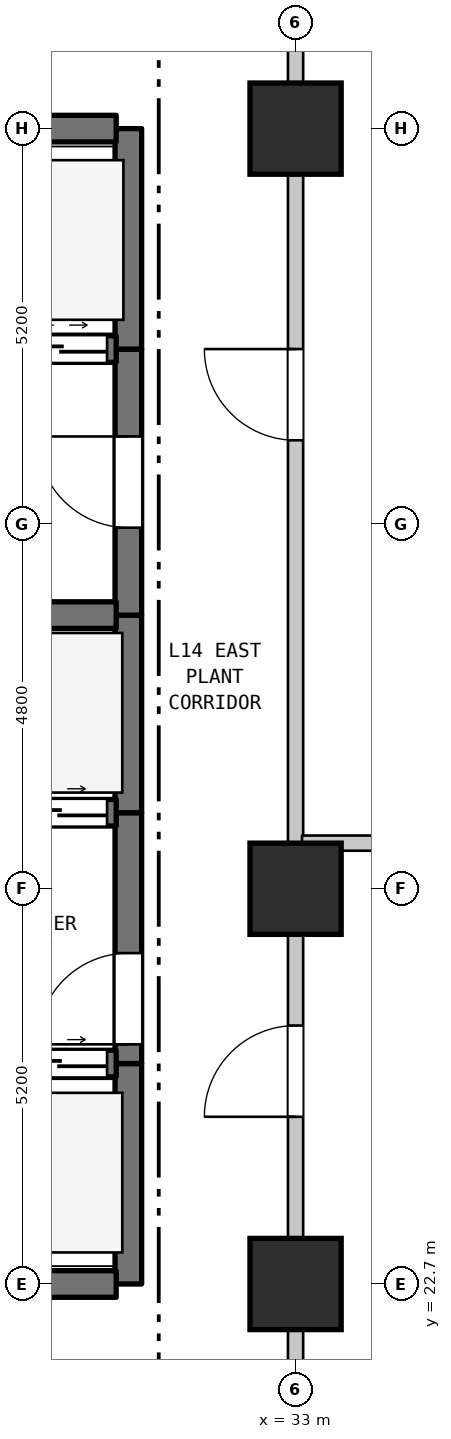
"""IFC4 building model, lengths in metres.
Left out: names, types, materials, properties, quantities, classifications, styles, units other than length and angle.
Written with IfcOpenShell. Run it as: python <this file> out.ifc"""

import sys

from ifc_helpers import new_model, si_unit, direction, frame, frame_2d, origin, origin_2d, place, context, subcontext, project, spatial, rectangle, extrude, element, fill, save


model = new_model("IFC4")
c1 = context("Model", 3, precision=1e-05, world=origin(), true_north=direction((0.0, 1.0)))
c2 = subcontext(c1, "Body", "Model", "MODEL_VIEW")
j1 = project(units=[si_unit("LENGTHUNIT", "METRE"), si_unit("PLANEANGLEUNIT", "RADIAN")], contexts=[c1])
p1 = place(None, origin())
s1 = spatial("IfcSite", under=j1, at=p1, CompositionType="ELEMENT")
p2 = place(p1, origin())
s2 = spatial("IfcBuilding", under=s1, at=p2, CompositionType="ELEMENT")
p3 = place(p2, frame((0.0, 0.0, 61.0)))
s3 = spatial("IfcBuildingStorey", under=s2, at=p3, CompositionType="ELEMENT", Elevation=61.0)
for number, where, z_axis, x_axis in (
    (1, (33.0, 22.7, 0.0), (0.0, 0.0, 1.0), (1.0, 0.0, 0.0)),
    (2, (33.0, 27.9, 0.0), (0.0, 0.0, 1.0), (1.0, 0.0, 0.0)),
    (3, (33.0, 37.9, 0.0), (0.0, 0.0, 1.0), (1.0, 0.0, 0.0)),
):
    element("IfcColumn", number, at=place(p3, frame(where, z_axis=z_axis, x_axis=x_axis)), inside=s3, PredefinedType="COLUMN", context=c2, shape_type="SweptSolid", body=[
        extrude(rectangle(XDim=1.2, YDim=1.2, at=origin_2d()), origin(), (0.0, 0.0, 1.0), 4.6),
    ])
p4 = place(p3, frame((30.8, 22.7, 0.0), z_axis=(0.0, 0.0, 1.0), x_axis=(0.0, 1.0, 0.0)))
e4 = element("IfcWall", 4, at=p4, inside=s3, PredefinedType="SHEAR", context=c2, shape_type="SweptSolid", body=[
    extrude(rectangle(XDim=2.9, YDim=0.35, at=frame_2d((1.45, 0.0))), origin(), (0.0, 0.0, 1.0), 4.28),
])
p5 = place(p3, frame((30.8, 25.6, 0.0), z_axis=(0.0, 0.0, 1.0), x_axis=(0.0, 1.0, 0.0)))
e5 = element("IfcWall", 5, at=p5, inside=s3, PredefinedType="SHEAR", context=c2, shape_type="SweptSolid", body=[
    extrude(rectangle(XDim=3.3, YDim=0.35, at=frame_2d((1.65, 0.0))), origin(), (0.0, 0.0, 1.0), 4.28),
])
p6 = place(p5, frame((0.253, 0.0, 0.0)))
e6 = element("IfcOpeningElement", 6, at=p6, cuts=e5, PredefinedType="OPENING", context=c2, shape_type="SweptSolid", body=[
    extrude(rectangle(XDim=1.2, YDim=2.2, at=frame_2d((0.6, 1.1))), frame((0.0, 0.185, 0.0), z_axis=(0.0, -1.0, 0.0), x_axis=(1.0, 0.0, 0.0)), (0.0, 0.0, 1.0), 0.37),
])
p7 = place(p3, frame((30.8, 28.9, 0.0), z_axis=(0.0, 0.0, 1.0), x_axis=(0.0, 1.0, 0.0)))
e7 = element("IfcWall", 7, at=p7, inside=s3, PredefinedType="SHEAR", context=c2, shape_type="SweptSolid", body=[
    extrude(rectangle(XDim=2.6, YDim=0.35, at=frame_2d((1.3, 0.0))), origin(), (0.0, 0.0, 1.0), 4.28),
])
p8 = place(p3, frame((30.8, 31.5, 0.0), z_axis=(0.0, 0.0, 1.0), x_axis=(0.0, 1.0, 0.0)))
e8 = element("IfcWall", 8, at=p8, inside=s3, PredefinedType="SHEAR", context=c2, shape_type="SweptSolid", body=[
    extrude(rectangle(XDim=3.5, YDim=0.35, at=frame_2d((1.75, 0.0))), origin(), (0.0, 0.0, 1.0), 4.28),
])
p9 = place(p8, frame((1.15, 0.0, 0.0)))
e9 = element("IfcOpeningElement", 9, at=p9, cuts=e8, PredefinedType="OPENING", context=c2, shape_type="SweptSolid", body=[
    extrude(rectangle(XDim=1.2, YDim=2.2, at=frame_2d((0.6, 1.1))), frame((0.0, 0.185, 0.0), z_axis=(0.0, -1.0, 0.0), x_axis=(1.0, 0.0, 0.0)), (0.0, 0.0, 1.0), 0.37),
])
p10 = place(p3, frame((30.8, 35.0, 0.0), z_axis=(0.0, 0.0, 1.0), x_axis=(0.0, 1.0, 0.0)))
e10 = element("IfcWall", 10, at=p10, inside=s3, PredefinedType="SHEAR", context=c2, shape_type="SweptSolid", body=[
    extrude(rectangle(XDim=2.9, YDim=0.35, at=frame_2d((1.45, 0.0))), origin(), (0.0, 0.0, 1.0), 4.28),
])
p11 = place(p3, frame((33.0, 20.3, 0.0), z_axis=(0.0, 0.0, 1.0), x_axis=(0.0, 1.0, 0.0)))
e11 = element("IfcWall", 11, at=p11, inside=s3, PredefinedType="STANDARD", context=c2, shape_type="SweptSolid", body=[
    extrude(rectangle(XDim=8.2, YDim=0.2, at=frame_2d((4.1, 0.0))), origin(), (0.0, 0.0, 1.0), 3.78),
])
p12 = place(p11, frame((4.6, 0.0, 0.0)))
e12 = element("IfcOpeningElement", 12, at=p12, cuts=e11, PredefinedType="OPENING", context=c2, shape_type="SweptSolid", body=[
    extrude(rectangle(XDim=1.2, YDim=2.2, at=frame_2d((0.6, 1.1))), frame((0.0, 0.11, 0.0), z_axis=(0.0, -1.0, 0.0), x_axis=(1.0, 0.0, 0.0)), (0.0, 0.0, 1.0), 0.22),
])
p13 = place(p3, frame((33.0, 28.5, 0.0), z_axis=(0.0, 0.0, 1.0), x_axis=(0.0, 1.0, 0.0)))
e13 = element("IfcWall", 13, at=p13, inside=s3, PredefinedType="STANDARD", context=c2, shape_type="SweptSolid", body=[
    extrude(rectangle(XDim=9.4, YDim=0.2, at=frame_2d((4.7, 0.0))), origin(), (0.0, 0.0, 1.0), 3.78),
])
p14 = place(p13, frame((5.3, 0.0, 0.0)))
e14 = element("IfcOpeningElement", 14, at=p14, cuts=e13, PredefinedType="OPENING", context=c2, shape_type="SweptSolid", body=[
    extrude(rectangle(XDim=1.2, YDim=2.2, at=frame_2d((0.6, 1.1))), frame((0.0, 0.11, 0.0), z_axis=(0.0, -1.0, 0.0), x_axis=(1.0, 0.0, 0.0)), (0.0, 0.0, 1.0), 0.22),
])
p15 = place(p3, frame((27.46, 22.7, 0.0), z_axis=(0.0, 0.0, 1.0), x_axis=(1.0, 0.0, 0.0)))
e15 = element("IfcWall", 15, at=p15, inside=s3, PredefinedType="SHEAR", context=c2, shape_type="SweptSolid", body=[
    extrude(rectangle(XDim=3.18, YDim=0.35, at=frame_2d((1.59, 0.0))), origin(), (0.0, 0.0, 1.0), 4.28),
])
p16 = place(p3, frame((27.46, 25.6, 0.0), z_axis=(0.0, 0.0, 1.0), x_axis=(1.0, 0.0, 0.0)))
e16 = element("IfcWall", 16, at=p16, inside=s3, PredefinedType="SHEAR", context=c2, shape_type="SweptSolid", body=[
    extrude(rectangle(XDim=3.18, YDim=0.35, at=frame_2d((1.59, 0.0))), origin(), (0.0, 0.0, 1.0), 4.28),
])
p17 = place(p16, frame((0.12, 0.0, 0.0)))
e17 = element("IfcOpeningElement", 17, at=p17, cuts=e16, PredefinedType="OPENING", context=c2, shape_type="SweptSolid", body=[
    extrude(rectangle(XDim=1.25, YDim=2.2, at=frame_2d((0.625, 1.1))), frame((0.0, 0.185, 0.0), z_axis=(0.0, -1.0, 0.0), x_axis=(1.0, 0.0, 0.0)), (0.0, 0.0, 1.0), 0.37),
])
p18 = place(p16, frame((1.81, 0.0, 0.0)))
e18 = element("IfcOpeningElement", 18, at=p18, cuts=e16, PredefinedType="OPENING", context=c2, shape_type="SweptSolid", body=[
    extrude(rectangle(XDim=1.25, YDim=2.2, at=frame_2d((0.625, 1.1))), frame((0.0, 0.185, 0.0), z_axis=(0.0, -1.0, 0.0), x_axis=(1.0, 0.0, 0.0)), (0.0, 0.0, 1.0), 0.37),
])
p19 = place(p3, frame((33.085, 28.5, 0.0), z_axis=(0.0, 0.0, 1.0), x_axis=(1.0, 0.0, 0.0)))
e19 = element("IfcWall", 19, at=p19, inside=s3, PredefinedType="STANDARD", context=c2, shape_type="SweptSolid", body=[
    extrude(rectangle(XDim=36.905, YDim=0.2, at=frame_2d((18.453, 0.0))), origin(), (0.0, 0.0, 1.0), 4.28),
])
p20 = place(p3, frame((27.46, 28.9, 0.0), z_axis=(0.0, 0.0, 1.0), x_axis=(1.0, 0.0, 0.0)))
e20 = element("IfcWall", 20, at=p20, inside=s3, PredefinedType="SHEAR", context=c2, shape_type="SweptSolid", body=[
    extrude(rectangle(XDim=3.18, YDim=0.35, at=frame_2d((1.59, 0.0))), origin(), (0.0, 0.0, 1.0), 4.28),
])
p21 = place(p20, frame((0.12, 0.0, 0.0)))
e21 = element("IfcOpeningElement", 21, at=p21, cuts=e20, PredefinedType="OPENING", context=c2, shape_type="SweptSolid", body=[
    extrude(rectangle(XDim=1.25, YDim=2.2, at=frame_2d((0.625, 1.1))), frame((0.0, 0.185, 0.0), z_axis=(0.0, -1.0, 0.0), x_axis=(1.0, 0.0, 0.0)), (0.0, 0.0, 1.0), 0.37),
])
p22 = place(p20, frame((1.81, 0.0, 0.0)))
e22 = element("IfcOpeningElement", 22, at=p22, cuts=e20, PredefinedType="OPENING", context=c2, shape_type="SweptSolid", body=[
    extrude(rectangle(XDim=1.25, YDim=2.2, at=frame_2d((0.625, 1.1))), frame((0.0, 0.185, 0.0), z_axis=(0.0, -1.0, 0.0), x_axis=(1.0, 0.0, 0.0)), (0.0, 0.0, 1.0), 0.37),
])
p23 = place(p3, frame((27.46, 31.5, 0.0), z_axis=(0.0, 0.0, 1.0), x_axis=(1.0, 0.0, 0.0)))
e23 = element("IfcWall", 23, at=p23, inside=s3, PredefinedType="SHEAR", context=c2, shape_type="SweptSolid", body=[
    extrude(rectangle(XDim=3.18, YDim=0.35, at=frame_2d((1.59, 0.0))), origin(), (0.0, 0.0, 1.0), 4.28),
])
p24 = place(p3, frame((19.16, 35.0, 0.0), z_axis=(0.0, 0.0, 1.0), x_axis=(1.0, 0.0, 0.0)))
e24 = element("IfcWall", 24, at=p24, inside=s3, PredefinedType="SHEAR", context=c2, shape_type="SweptSolid", body=[
    extrude(rectangle(XDim=11.48, YDim=0.35, at=frame_2d((5.74, 0.0))), origin(), (0.0, 0.0, 1.0), 4.28),
])
p25 = place(p24, frame((0.365, 0.0, 0.0)))
e25 = element("IfcOpeningElement", 25, at=p25, cuts=e24, PredefinedType="OPENING", context=c2, shape_type="SweptSolid", body=[
    extrude(rectangle(XDim=1.35, YDim=2.2, at=frame_2d((0.675, 1.1))), frame((0.0, 0.185, 0.0), z_axis=(0.0, -1.0, 0.0), x_axis=(1.0, 0.0, 0.0)), (0.0, 0.0, 1.0), 0.37),
])
p26 = place(p24, frame((2.765, 0.0, 0.0)))
e26 = element("IfcOpeningElement", 26, at=p26, cuts=e24, PredefinedType="OPENING", context=c2, shape_type="SweptSolid", body=[
    extrude(rectangle(XDim=1.35, YDim=2.2, at=frame_2d((0.675, 1.1))), frame((0.0, 0.185, 0.0), z_axis=(0.0, -1.0, 0.0), x_axis=(1.0, 0.0, 0.0)), (0.0, 0.0, 1.0), 0.37),
])
p27 = place(p24, frame((4.915, 0.0, 0.0)))
e27 = element("IfcOpeningElement", 27, at=p27, cuts=e24, PredefinedType="OPENING", context=c2, shape_type="SweptSolid", body=[
    extrude(rectangle(XDim=1.2, YDim=2.2, at=frame_2d((0.6, 1.1))), frame((0.0, 0.185, 0.0), z_axis=(0.0, -1.0, 0.0), x_axis=(1.0, 0.0, 0.0)), (0.0, 0.0, 1.0), 0.37),
])
p28 = place(p24, frame((6.665, 0.0, 0.0)))
e28 = element("IfcOpeningElement", 28, at=p28, cuts=e24, PredefinedType="OPENING", context=c2, shape_type="SweptSolid", body=[
    extrude(rectangle(XDim=1.2, YDim=2.2, at=frame_2d((0.6, 1.1))), frame((0.0, 0.185, 0.0), z_axis=(0.0, -1.0, 0.0), x_axis=(1.0, 0.0, 0.0)), (0.0, 0.0, 1.0), 0.37),
])
p29 = place(p24, frame((8.415, 0.0, 0.0)))
e29 = element("IfcOpeningElement", 29, at=p29, cuts=e24, PredefinedType="OPENING", context=c2, shape_type="SweptSolid", body=[
    extrude(rectangle(XDim=1.2, YDim=2.2, at=frame_2d((0.6, 1.1))), frame((0.0, 0.185, 0.0), z_axis=(0.0, -1.0, 0.0), x_axis=(1.0, 0.0, 0.0)), (0.0, 0.0, 1.0), 0.37),
])
p30 = place(p24, frame((10.16, 0.0, 0.0)))
e30 = element("IfcOpeningElement", 30, at=p30, cuts=e24, PredefinedType="OPENING", context=c2, shape_type="SweptSolid", body=[
    extrude(rectangle(XDim=1.2, YDim=2.2, at=frame_2d((0.6, 1.1))), frame((0.0, 0.185, 0.0), z_axis=(0.0, -1.0, 0.0), x_axis=(1.0, 0.0, 0.0)), (0.0, 0.0, 1.0), 0.37),
])
p31 = place(p3, frame((19.16, 37.9, 0.0), z_axis=(0.0, 0.0, 1.0), x_axis=(1.0, 0.0, 0.0)))
e31 = element("IfcWall", 31, at=p31, inside=s3, PredefinedType="SHEAR", context=c2, shape_type="SweptSolid", body=[
    extrude(rectangle(XDim=11.48, YDim=0.35, at=frame_2d((5.74, 0.0))), origin(), (0.0, 0.0, 1.0), 4.28),
])
p32 = place(p3, frame((33.0, 37.9, 0.0), z_axis=(0.0, 0.0, 1.0), x_axis=(0.0, 1.0, 0.0)))
e32 = element("IfcWall", 32, at=p32, inside=s3, PredefinedType="STANDARD", context=c2, shape_type="SweptSolid", body=[
    extrude(rectangle(XDim=2.4, YDim=0.2, at=frame_2d((1.2, 0.0))), origin(), (0.0, 0.0, 1.0), 3.68),
])
p33 = place(p6, origin())
e33 = element("IfcDoor", 33, at=p33, inside=s3, OperationType="SINGLE_SWING_LEFT", PredefinedType="DOOR", context=c2, shape_type="SweptSolid", body=[
    extrude(rectangle(XDim=1.2, YDim=2.2, at=frame_2d((0.6, 1.1))), frame((0.0, 0.025, 0.0), z_axis=(0.0, -1.0, 0.0), x_axis=(1.0, 0.0, 0.0)), (0.0, 0.0, 1.0), 0.05),
])
fill(e6, e33)
p34 = place(p9, origin())
e34 = element("IfcDoor", 34, at=p34, inside=s3, OperationType="SINGLE_SWING_RIGHT", PredefinedType="DOOR", context=c2, shape_type="SweptSolid", body=[
    extrude(rectangle(XDim=1.2, YDim=2.2, at=frame_2d((0.6, 1.1))), frame((0.0, 0.025, 0.0), z_axis=(0.0, -1.0, 0.0), x_axis=(1.0, 0.0, 0.0)), (0.0, 0.0, 1.0), 0.05),
])
fill(e9, e34)
p35 = place(p12, origin())
e35 = element("IfcDoor", 35, at=p35, inside=s3, OperationType="SINGLE_SWING_LEFT", PredefinedType="DOOR", context=c2, shape_type="SweptSolid", body=[
    extrude(rectangle(XDim=1.2, YDim=2.2, at=frame_2d((0.6, 1.1))), frame((0.0, 0.025, 0.0), z_axis=(0.0, -1.0, 0.0), x_axis=(1.0, 0.0, 0.0)), (0.0, 0.0, 1.0), 0.05),
])
fill(e12, e35)
p36 = place(p14, origin())
e36 = element("IfcDoor", 36, at=p36, inside=s3, OperationType="SINGLE_SWING_RIGHT", PredefinedType="DOOR", context=c2, shape_type="SweptSolid", body=[
    extrude(rectangle(XDim=1.2, YDim=2.2, at=frame_2d((0.6, 1.1))), frame((0.0, 0.025, 0.0), z_axis=(0.0, -1.0, 0.0), x_axis=(1.0, 0.0, 0.0)), (0.0, 0.0, 1.0), 0.05),
])
fill(e14, e36)
p37 = place(p18, origin())
e37 = element("IfcDoor", 37, at=p37, inside=s3, OperationType="DOUBLE_DOOR_SLIDING", PredefinedType="DOOR", context=c2, shape_type="SweptSolid", body=[
    extrude(rectangle(XDim=1.25, YDim=2.2, at=frame_2d((0.625, 1.1))), frame((0.0, 0.025, 0.0), z_axis=(0.0, -1.0, 0.0), x_axis=(1.0, 0.0, 0.0)), (0.0, 0.0, 1.0), 0.05),
])
fill(e18, e37)
p38 = place(p22, origin())
e38 = element("IfcDoor", 38, at=p38, inside=s3, OperationType="DOUBLE_DOOR_SLIDING", PredefinedType="DOOR", context=c2, shape_type="SweptSolid", body=[
    extrude(rectangle(XDim=1.25, YDim=2.2, at=frame_2d((0.625, 1.1))), frame((0.0, 0.025, 0.0), z_axis=(0.0, -1.0, 0.0), x_axis=(1.0, 0.0, 0.0)), (0.0, 0.0, 1.0), 0.05),
])
fill(e22, e38)
p39 = place(p30, origin())
e39 = element("IfcDoor", 39, at=p39, inside=s3, OperationType="DOUBLE_DOOR_SLIDING", PredefinedType="DOOR", context=c2, shape_type="SweptSolid", body=[
    extrude(rectangle(XDim=1.2, YDim=2.2, at=frame_2d((0.6, 1.1))), frame((0.0, 0.025, 0.0), z_axis=(0.0, -1.0, 0.0), x_axis=(1.0, 0.0, 0.0)), (0.0, 0.0, 1.0), 0.05),
])
fill(e30, e39)
save(model, sys.argv[1])
